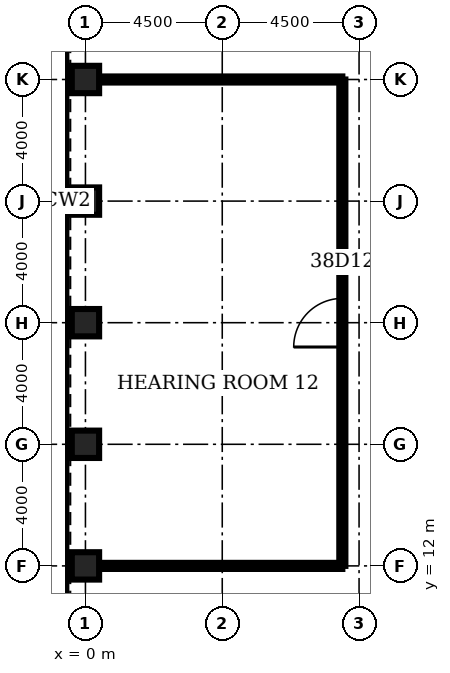
"""IFC4 building model, lengths in metres.
Left out: names, types, materials, properties, quantities, classifications, styles, units other than length and angle.
Written with IfcOpenShell. Run it as: python <this file> out.ifc"""

import sys

from ifc_helpers import new_model, si_unit, direction, frame, frame_2d, origin, origin_2d, place, context, subcontext, project, spatial, rectangle, hollow_rectangle, extrude, element, fill, save


model = new_model("IFC4")
c1 = context("Model", 3, precision=1e-05, world=origin(), true_north=direction((0.0, 1.0)))
c2 = subcontext(c1, "Body", "Model", "MODEL_VIEW")
j1 = project(units=[si_unit("LENGTHUNIT", "METRE"), si_unit("PLANEANGLEUNIT", "RADIAN")], contexts=[c1])
p1 = place(None, origin())
s1 = spatial("IfcSite", under=j1, at=p1, CompositionType="ELEMENT")
p2 = place(p1, origin())
s2 = spatial("IfcBuilding", under=s1, at=p2, CompositionType="ELEMENT")
p3 = place(p2, frame((0.0, 0.0, 171.9)))
s3 = spatial("IfcBuildingStorey", under=s2, at=p3, CompositionType="ELEMENT", Elevation=171.9)
for number, where, z_axis, x_axis in (
    (1, (0.0, 28.0, 0.0), (0.0, 0.0, 1.0), (1.0, 0.0, 0.0)),
    (2, (0.0, 24.0, 0.0), (0.0, 0.0, 1.0), (1.0, 0.0, 0.0)),
    (3, (0.0, 20.0, 0.0), (0.0, 0.0, 1.0), (1.0, 0.0, 0.0)),
    (4, (0.0, 16.0, 0.0), (0.0, 0.0, 1.0), (1.0, 0.0, 0.0)),
    (5, (0.0, 12.0, 0.0), (0.0, 0.0, 1.0), (1.0, 0.0, 0.0)),
):
    element("IfcColumn", number, at=place(p3, frame(where, z_axis=z_axis, x_axis=x_axis)), inside=s3, PredefinedType="COLUMN", context=c2, shape_type="SweptSolid", body=[
        extrude(hollow_rectangle(XDim=0.9, YDim=0.9, WallThickness=0.09, at=origin_2d()), origin(), (0.0, 0.0, 1.0), 4.2),
    ])
for number, where, z_axis, x_axis in (
    (6, (0.45, 12.0, 0.0), (0.0, 0.0, 1.0), (1.0, 0.0, 0.0)),
    (7, (0.45, 28.0, 0.0), (0.0, 0.0, 1.0), (1.0, 0.0, 0.0)),
):
    element("IfcWall", number, at=place(p3, frame(where, z_axis=z_axis, x_axis=x_axis)), inside=s3, PredefinedType="PARTITIONING", context=c2, shape_type="SweptSolid", body=[
        extrude(rectangle(XDim=8.0, YDim=0.2, at=frame_2d((4.0, 0.0))), origin(), (0.0, 0.0, 1.0), 3.0),
    ])
p4 = place(p3, frame((8.45, 12.0, 0.0), z_axis=(0.0, 0.0, 1.0), x_axis=(0.0, 1.0, 0.0)))
e8 = element("IfcWall", 8, at=p4, inside=s3, PredefinedType="PARTITIONING", context=c2, shape_type="SweptSolid", body=[
    extrude(rectangle(XDim=16.0, YDim=0.2, at=frame_2d((8.0, 0.0))), origin(), (0.0, 0.0, 1.0), 3.0),
])
p5 = place(p4, frame((7.2, 0.0, 0.0)))
e9 = element("IfcOpeningElement", 9, at=p5, cuts=e8, PredefinedType="OPENING", context=c2, shape_type="SweptSolid", body=[
    extrude(rectangle(XDim=1.6, YDim=2.1, at=frame_2d((0.8, 1.05))), frame((0.0, 0.11, 0.0), z_axis=(0.0, -1.0, 0.0), x_axis=(1.0, 0.0, 0.0)), (0.0, 0.0, 1.0), 0.22),
])
p6 = place(p5, origin())
e10 = element("IfcDoor", 10, at=p6, inside=s3, OperationType="SINGLE_SWING_LEFT", PredefinedType="DOOR", context=c2, shape_type="SweptSolid", body=[
    extrude(rectangle(XDim=1.6, YDim=2.1, at=frame_2d((0.8, 1.05))), frame((0.0, 0.025, 0.0), z_axis=(0.0, -1.0, 0.0), x_axis=(1.0, 0.0, 0.0)), (0.0, 0.0, 1.0), 0.05),
])
fill(e9, e10)
save(model, sys.argv[1])
